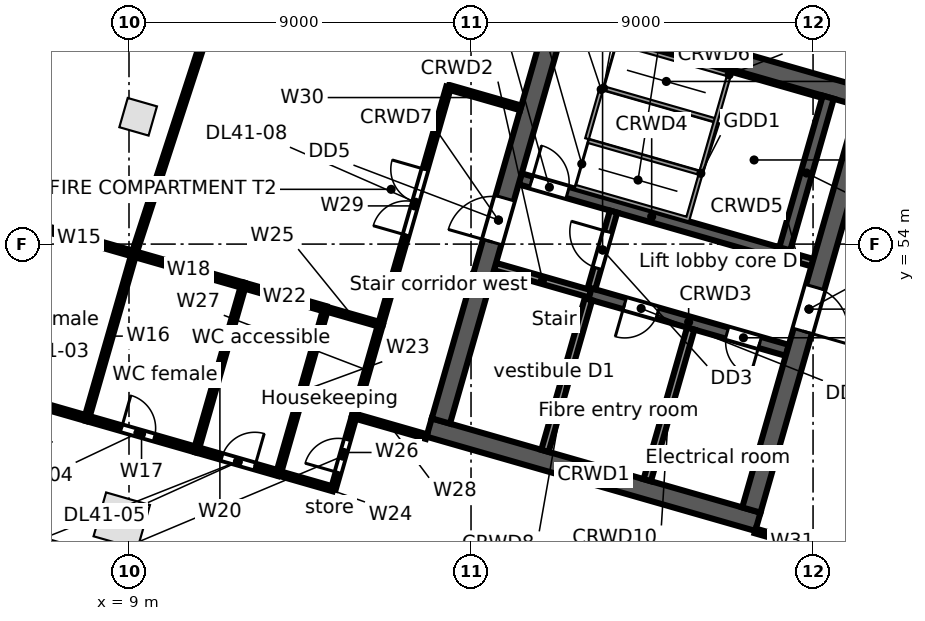
"""IFC4 building model, lengths in metres.
Left out: names, types, materials, properties, quantities, classifications, styles, units other than length and angle.
Written with IfcOpenShell. Run it as: python <this file> out.ifc"""

import sys

from ifc_helpers import new_model, si_unit, direction, frame, frame_2d, origin, origin_2d, place, context, subcontext, project, spatial, rectangle, extrude, element, fill, save


model = new_model("IFC4")
c1 = context("Model", 3, precision=1e-05, world=origin(), true_north=direction((0.0, 1.0)))
c2 = subcontext(c1, "Body", "Model", "MODEL_VIEW")
j1 = project(units=[si_unit("LENGTHUNIT", "METRE"), si_unit("PLANEANGLEUNIT", "RADIAN")], contexts=[c1])
p1 = place(None, origin())
s1 = spatial("IfcSite", under=j1, at=p1, CompositionType="ELEMENT")
p2 = place(p1, origin())
s2 = spatial("IfcBuilding", under=s1, at=p2, CompositionType="ELEMENT")
p3 = place(p2, frame((0.0, 0.0, 198.9)))
s3 = spatial("IfcBuildingStorey", under=s2, at=p3, CompositionType="ELEMENT", Elevation=198.9)
p4 = place(p3, frame((8.81, 46.722, 0.0), z_axis=(0.0, 0.0, 1.0), x_axis=(0.961261695938, -0.275637355817, 0.0)))
e1 = element("IfcColumn", 1, at=p4, inside=s3, PredefinedType="COLUMN", context=c2, shape_type="SweptSolid", body=[
    extrude(rectangle(XDim=1.2, YDim=1.2, at=origin_2d()), origin(), (0.0, 0.0, 1.0), 4.0),
])
p5 = place(p3, frame((9.241, 57.35, 0.0), z_axis=(0.0, 0.0, 1.0), x_axis=(0.961261695938, -0.275637355817, 0.0)))
e2 = element("IfcColumn", 2, at=p5, inside=s3, PredefinedType="COLUMN", context=c2, shape_type="SweptSolid", body=[
    extrude(rectangle(XDim=0.8, YDim=0.8, at=origin_2d()), origin(), (0.0, 0.0, 1.0), 4.0),
])
p6 = place(p3, frame((24.042, 41.106, 0.0), z_axis=(0.0, 0.0, 1.0), x_axis=(-0.961261693976, 0.275637362661, 0.0)))
e3 = element("IfcWall", 3, at=p6, inside=s3, PredefinedType="STANDARD", context=c2, shape_type="SweptSolid", body=[
    extrude(rectangle(XDim=24.948, YDim=0.3, at=frame_2d((12.474, 0.0))), origin(), (0.0, 0.0, 1.0), 3.65),
])
p7 = place(p6, frame((21.441, 0.0, 0.6)))
e4 = element("IfcOpeningElement", 4, at=p7, cuts=e3, PredefinedType="OPENING", context=c2, shape_type="SweptSolid", body=[
    extrude(rectangle(XDim=0.9, YDim=2.4, at=frame_2d((0.45, 1.2))), frame((0.0, 0.16, 0.0), z_axis=(0.0, -1.0, 0.0), x_axis=(1.0, 0.0, 0.0)), (0.0, 0.0, 1.0), 0.32),
])
p8 = place(p6, frame((13.121, 0.0, 0.6)))
e5 = element("IfcOpeningElement", 5, at=p8, cuts=e3, PredefinedType="OPENING", context=c2, shape_type="SweptSolid", body=[
    extrude(rectangle(XDim=0.9, YDim=2.4, at=frame_2d((0.45, 1.2))), frame((0.0, 0.16, 0.0), z_axis=(0.0, -1.0, 0.0), x_axis=(1.0, 0.0, 0.0)), (0.0, 0.0, 1.0), 0.32),
])
p9 = place(p6, frame((10.591, 0.0, 0.0)))
e6 = element("IfcOpeningElement", 6, at=p9, cuts=e3, PredefinedType="OPENING", context=c2, shape_type="SweptSolid", body=[
    extrude(rectangle(XDim=1.8, YDim=2.4, at=frame_2d((0.9, 1.2))), frame((0.0, 0.16, 0.0), z_axis=(0.0, -1.0, 0.0), x_axis=(1.0, 0.0, 0.0)), (0.0, 0.0, 1.0), 0.32),
])
p10 = place(p6, frame((4.8, 0.0, 0.6)))
e7 = element("IfcOpeningElement", 7, at=p10, cuts=e3, PredefinedType="OPENING", context=c2, shape_type="SweptSolid", body=[
    extrude(rectangle(XDim=0.9, YDim=2.4, at=frame_2d((0.45, 1.2))), frame((0.0, 0.16, 0.0), z_axis=(0.0, -1.0, 0.0), x_axis=(1.0, 0.0, 0.0)), (0.0, 0.0, 1.0), 0.32),
])
p11 = place(p6, frame((2.27, 0.0, 0.0)))
e8 = element("IfcOpeningElement", 8, at=p11, cuts=e3, PredefinedType="OPENING", context=c2, shape_type="SweptSolid", body=[
    extrude(rectangle(XDim=1.8, YDim=2.4, at=frame_2d((0.9, 1.2))), frame((0.0, 0.16, 0.0), z_axis=(0.0, -1.0, 0.0), x_axis=(1.0, 0.0, 0.0)), (0.0, 0.0, 1.0), 0.32),
])
p12 = place(p3, frame((37.399, 59.851, 0.0), z_axis=(0.0, 0.0, 1.0), x_axis=(-0.529919986982, -0.848047644532, 0.0)))
e9 = element("IfcWall", 9, at=p12, inside=s3, PredefinedType="STANDARD", context=c2, shape_type="SweptSolid", body=[
    extrude(rectangle(XDim=21.125, YDim=0.3, at=frame_2d((10.562, 0.0))), origin(), (0.0, 0.0, 1.0), 3.65),
])
p13 = place(p12, frame((16.687, 0.0, 0.6)))
e10 = element("IfcOpeningElement", 10, at=p13, cuts=e9, PredefinedType="OPENING", context=c2, shape_type="SweptSolid", body=[
    extrude(rectangle(XDim=0.9, YDim=2.4, at=frame_2d((0.45, 1.2))), frame((0.0, 0.16, 0.0), z_axis=(0.0, -1.0, 0.0), x_axis=(1.0, 0.0, 0.0)), (0.0, 0.0, 1.0), 0.32),
])
p14 = place(p12, frame((6.187, 0.0, 0.6)))
e11 = element("IfcOpeningElement", 11, at=p14, cuts=e9, PredefinedType="OPENING", context=c2, shape_type="SweptSolid", body=[
    extrude(rectangle(XDim=0.9, YDim=2.4, at=frame_2d((0.45, 1.2))), frame((0.0, 0.16, 0.0), z_axis=(0.0, -1.0, 0.0), x_axis=(1.0, 0.0, 0.0)), (0.0, 0.0, 1.0), 0.32),
])
p15 = place(p3, frame((16.897, 49.173, 0.0), z_axis=(0.0, 0.0, 1.0), x_axis=(0.96126248289, -0.275634611374, 0.0)))
e12 = element("IfcWall", 12, at=p15, inside=s3, PredefinedType="SOLIDWALL", context=c2, shape_type="SweptSolid", body=[
    extrude(rectangle(XDim=9.0, YDim=0.5, at=frame_2d((4.5, 0.0))), origin(), (0.0, 0.0, 1.0), 3.65),
])
p16 = place(p3, frame((18.632, 53.409, 0.0), z_axis=(0.0, 0.0, 1.0), x_axis=(0.961247078216, -0.275688328772, 0.0)))
e13 = element("IfcWall", 13, at=p16, inside=s3, PredefinedType="SOLIDWALL", context=c2, shape_type="SweptSolid", body=[
    extrude(rectangle(XDim=2.6, YDim=0.2, at=frame_2d((1.3, 0.0))), origin(), (0.0, 0.0, 1.0), 3.65),
])
p17 = place(p3, frame((21.131, 52.692, 0.0), z_axis=(0.0, 0.0, 1.0), x_axis=(0.961271043721, -0.27560475414, 0.0)))
e14 = element("IfcWall", 14, at=p17, inside=s3, PredefinedType="SOLIDWALL", context=c2, shape_type="SweptSolid", body=[
    extrude(rectangle(XDim=5.4, YDim=0.3, at=frame_2d((2.7, 0.0))), origin(), (0.0, 0.0, 1.0), 3.65),
])
p18 = place(p17, frame((0.95, 0.0, 0.0)))
e15 = element("IfcOpeningElement", 15, at=p18, cuts=e14, PredefinedType="OPENING", context=c2, shape_type="SweptSolid", body=[
    extrude(rectangle(XDim=0.9, YDim=2.1, at=frame_2d((0.45, 1.05))), frame((0.0, 0.16, 0.0), z_axis=(0.0, -1.0, 0.0), x_axis=(1.0, 0.0, 0.0)), (0.0, 0.0, 1.0), 0.32),
])
p19 = place(p17, frame((3.75, 0.0, 0.0)))
e16 = element("IfcOpeningElement", 16, at=p19, cuts=e14, PredefinedType="OPENING", context=c2, shape_type="SweptSolid", body=[
    extrude(rectangle(XDim=0.9, YDim=2.1, at=frame_2d((0.45, 1.05))), frame((0.0, 0.16, 0.0), z_axis=(0.0, -1.0, 0.0), x_axis=(1.0, 0.0, 0.0)), (0.0, 0.0, 1.0), 0.32),
])
p20 = place(p3, frame((19.293, 55.716, 0.0), z_axis=(0.0, 0.0, 1.0), x_axis=(0.96125862491, -0.275648065539, 0.0)))
e17 = element("IfcWall", 17, at=p20, inside=s3, PredefinedType="SOLIDWALL", context=c2, shape_type="SweptSolid", body=[
    extrude(rectangle(XDim=7.2, YDim=0.3, at=frame_2d((3.6, 0.0))), origin(), (0.0, 0.0, 1.0), 3.65),
])
p21 = place(p20, frame((0.3, 0.0, 0.0)))
e18 = element("IfcOpeningElement", 18, at=p21, cuts=e17, PredefinedType="OPENING", context=c2, shape_type="SweptSolid", body=[
    extrude(rectangle(XDim=1.0, YDim=2.1, at=frame_2d((0.5, 1.05))), frame((0.0, 0.16, 0.0), z_axis=(0.0, -1.0, 0.0), x_axis=(1.0, 0.0, 0.0)), (0.0, 0.0, 1.0), 0.32),
])
p22 = place(p3, frame((26.214, 53.732, 0.0), z_axis=(0.0, 0.0, 1.0), x_axis=(0.961200870072, -0.275849392554, 0.0)))
e19 = element("IfcWall", 19, at=p22, inside=s3, PredefinedType="SOLIDWALL", context=c2, shape_type="SweptSolid", body=[
    extrude(rectangle(XDim=0.8, YDim=0.2, at=frame_2d((0.4, 0.0))), origin(), (0.0, 0.0, 1.0), 3.65),
])
p23 = place(p3, frame((20.067, 60.228, 0.0), z_axis=(0.0, 0.0, 1.0), x_axis=(0.96126248289, -0.275634611374, 0.0)))
e20 = element("IfcWall", 20, at=p23, inside=s3, PredefinedType="SOLIDWALL", context=c2, shape_type="SweptSolid", body=[
    extrude(rectangle(XDim=9.0, YDim=0.5, at=frame_2d((4.5, 0.0))), origin(), (0.0, 0.0, 1.0), 3.65),
])
p24 = place(p3, frame((17.206, 49.344, 0.0), z_axis=(0.0, 0.0, 1.0), x_axis=(0.275632651182, 0.961263044958, 0.0)))
e21 = element("IfcWall", 21, at=p24, inside=s3, PredefinedType="SOLIDWALL", context=c2, shape_type="SweptSolid", body=[
    extrude(rectangle(XDim=11.0, YDim=0.5, at=frame_2d((5.5, 0.0))), origin(), (0.0, 0.0, 1.0), 3.65),
])
p25 = place(p24, frame((4.9, 0.0, 0.0)))
e22 = element("IfcOpeningElement", 22, at=p25, cuts=e21, PredefinedType="OPENING", context=c2, shape_type="SweptSolid", body=[
    extrude(rectangle(XDim=1.2, YDim=2.1, at=frame_2d((0.6, 1.05))), frame((0.0, 0.26, 0.0), z_axis=(0.0, -1.0, 0.0), x_axis=(1.0, 0.0, 0.0)), (0.0, 0.0, 1.0), 0.52),
])
p26 = place(p3, frame((19.946, 48.559, 0.0), z_axis=(0.0, 0.0, 1.0), x_axis=(0.275668905258, 0.961252648721, 0.0)))
e23 = element("IfcWall", 23, at=p26, inside=s3, PredefinedType="SOLIDWALL", context=c2, shape_type="SweptSolid", body=[
    extrude(rectangle(XDim=4.15, YDim=0.2, at=frame_2d((2.075, 0.0))), origin(), (0.0, 0.0, 1.0), 3.65),
])
p27 = place(p3, frame((21.172, 52.837, 0.0), z_axis=(0.0, 0.0, 1.0), x_axis=(0.275657676022, 0.961255868981, 0.0)))
e24 = element("IfcWall", 24, at=p27, inside=s3, PredefinedType="PARTITIONING", context=c2, shape_type="SweptSolid", body=[
    extrude(rectangle(XDim=2.1, YDim=0.2, at=frame_2d((1.05, 0.0))), origin(), (0.0, 0.0, 1.0), 3.65),
])
p28 = place(p27, frame((0.55, 0.0, 0.0)))
e25 = element("IfcOpeningElement", 25, at=p28, cuts=e24, PredefinedType="OPENING", context=c2, shape_type="SweptSolid", body=[
    extrude(rectangle(XDim=1.0, YDim=2.1, at=frame_2d((0.5, 1.05))), frame((0.0, 0.11, 0.0), z_axis=(0.0, -1.0, 0.0), x_axis=(1.0, 0.0, 0.0)), (0.0, 0.0, 1.0), 0.22),
])
p29 = place(p3, frame((22.637, 47.787, 0.0), z_axis=(0.0, 0.0, 1.0), x_axis=(0.275614546295, 0.961268236171, 0.0)))
e26 = element("IfcWall", 26, at=p29, inside=s3, PredefinedType="PARTITIONING", context=c2, shape_type="SweptSolid", body=[
    extrude(rectangle(XDim=4.15, YDim=0.2, at=frame_2d((2.075, 0.0))), origin(), (0.0, 0.0, 1.0), 3.65),
])
p30 = place(p3, frame((26.256, 53.876, 0.0), z_axis=(0.0, 0.0, 1.0), x_axis=(0.275614546295, 0.961268236171, 0.0)))
e27 = element("IfcWall", 27, at=p30, inside=s3, PredefinedType="SOLIDWALL", context=c2, shape_type="SweptSolid", body=[
    extrude(rectangle(XDim=4.15, YDim=0.3, at=frame_2d((2.075, 0.0))), origin(), (0.0, 0.0, 1.0), 3.65),
])
p31 = place(p3, frame((25.377, 47.002, 0.0), z_axis=(0.0, 0.0, 1.0), x_axis=(0.275632651182, 0.961263044958, 0.0)))
e28 = element("IfcWall", 28, at=p31, inside=s3, PredefinedType="SOLIDWALL", context=c2, shape_type="SweptSolid", body=[
    extrude(rectangle(XDim=11.0, YDim=0.5, at=frame_2d((5.5, 0.0))), origin(), (0.0, 0.0, 1.0), 3.65),
])
p32 = place(p31, frame((4.9, 0.0, 0.0)))
e29 = element("IfcOpeningElement", 29, at=p32, cuts=e28, PredefinedType="OPENING", context=c2, shape_type="SweptSolid", body=[
    extrude(rectangle(XDim=1.2, YDim=2.1, at=frame_2d((0.6, 1.05))), frame((0.0, 0.26, 0.0), z_axis=(0.0, -1.0, 0.0), x_axis=(1.0, 0.0, 0.0)), (0.0, 0.0, 1.0), 0.52),
])
p33 = place(p3, frame((5.004, 50.243, 0.0), z_axis=(0.0, 0.0, 1.0), x_axis=(0.961268664977, -0.27561305073, 0.0)))
e30 = element("IfcWall", 30, at=p33, inside=s3, PredefinedType="PARTITIONING", context=c2, shape_type="SweptSolid", body=[
    extrude(rectangle(XDim=3.0, YDim=0.15, at=frame_2d((1.5, 0.0))), origin(), (0.0, 0.0, 1.0), 3.65),
])
p34 = place(p33, frame((0.95, 0.0, 0.0)))
e31 = element("IfcOpeningElement", 31, at=p34, cuts=e30, PredefinedType="OPENING", context=c2, shape_type="SweptSolid", body=[
    extrude(rectangle(XDim=0.9, YDim=2.1, at=frame_2d((0.45, 1.05))), frame((0.0, 0.085, 0.0), z_axis=(0.0, -1.0, 0.0), x_axis=(1.0, 0.0, 0.0)), (0.0, 0.0, 1.0), 0.17),
])
p35 = place(p3, frame((6.245, 54.568, 0.0), z_axis=(0.0, 0.0, 1.0), x_axis=(0.961240918172, -0.275709806194, 0.0)))
e32 = element("IfcWall", 32, at=p35, inside=s3, PredefinedType="PARTITIONING", context=c2, shape_type="SweptSolid", body=[
    extrude(rectangle(XDim=3.0, YDim=0.15, at=frame_2d((1.5, 0.0))), origin(), (0.0, 0.0, 1.0), 2.83),
])
p36 = place(p3, frame((7.888, 49.416, 0.0), z_axis=(0.0, 0.0, 1.0), x_axis=(0.275803080638, 0.96121415965, 0.0)))
e33 = element("IfcWall", 33, at=p36, inside=s3, PredefinedType="PARTITIONING", context=c2, shape_type="SweptSolid", body=[
    extrude(rectangle(XDim=4.5, YDim=0.125, at=frame_2d((2.25, 0.0))), origin(), (0.0, 0.0, 1.0), 2.83),
])
p37 = place(p3, frame((7.888, 49.416, 0.0), z_axis=(0.0, 0.0, 1.0), x_axis=(0.961268664977, -0.27561305073, 0.0)))
e34 = element("IfcWall", 34, at=p37, inside=s3, PredefinedType="PARTITIONING", context=c2, shape_type="SweptSolid", body=[
    extrude(rectangle(XDim=3.0, YDim=0.15, at=frame_2d((1.5, 0.0))), origin(), (0.0, 0.0, 1.0), 2.718),
])
p38 = place(p37, frame((0.95, 0.0, 0.0)))
e35 = element("IfcOpeningElement", 35, at=p38, cuts=e34, PredefinedType="OPENING", context=c2, shape_type="SweptSolid", body=[
    extrude(rectangle(XDim=0.9, YDim=2.1, at=frame_2d((0.45, 1.05))), frame((0.0, 0.085, 0.0), z_axis=(0.0, -1.0, 0.0), x_axis=(1.0, 0.0, 0.0)), (0.0, 0.0, 1.0), 0.17),
])
p39 = place(p3, frame((9.129, 53.741, 0.0), z_axis=(0.0, 0.0, 1.0), x_axis=(0.961243927922, -0.275699312717, 0.0)))
e36 = element("IfcWall", 36, at=p39, inside=s3, PredefinedType="PARTITIONING", context=c2, shape_type="SweptSolid", body=[
    extrude(rectangle(XDim=2.999, YDim=0.15, at=frame_2d((1.5, 0.0))), origin(), (0.0, 0.0, 1.0), 2.718),
])
p40 = place(p3, frame((9.129, 53.741, 0.0), z_axis=(0.0, 0.0, 1.0), x_axis=(0.309576741849, 0.950874461171, 0.0)))
e37 = element("IfcWall", 37, at=p40, inside=s3, PredefinedType="PARTITIONING", context=c2, shape_type="SweptSolid", body=[
    extrude(rectangle(XDim=14.895, YDim=0.125, at=frame_2d((7.447, 0.0))), origin(), (0.0, 0.0, 1.0), 2.718),
])
p41 = place(p3, frame((10.772, 48.589, 0.0), z_axis=(0.0, 0.0, 1.0), x_axis=(0.275602532653, 0.961271680637, 0.0)))
e38 = element("IfcWall", 38, at=p41, inside=s3, PredefinedType="PARTITIONING", context=c2, shape_type="SweptSolid", body=[
    extrude(rectangle(XDim=4.499, YDim=0.125, at=frame_2d((2.25, 0.0))), origin(), (0.0, 0.0, 1.0), 3.65),
])
p42 = place(p3, frame((10.772, 48.589, 0.0), z_axis=(0.0, 0.0, 1.0), x_axis=(0.96127791106, -0.275580800688, 0.0)))
e39 = element("IfcWall", 39, at=p42, inside=s3, PredefinedType="PARTITIONING", context=c2, shape_type="SweptSolid", body=[
    extrude(rectangle(XDim=2.25, YDim=0.15, at=frame_2d((1.125, 0.0))), origin(), (0.0, 0.0, 1.0), 3.65),
])
p43 = place(p42, frame((0.7, 0.0, 0.0)))
e40 = element("IfcOpeningElement", 40, at=p43, cuts=e39, PredefinedType="OPENING", context=c2, shape_type="SweptSolid", body=[
    extrude(rectangle(XDim=0.9, YDim=2.1, at=frame_2d((0.45, 1.05))), frame((0.0, 0.085, 0.0), z_axis=(0.0, -1.0, 0.0), x_axis=(1.0, 0.0, 0.0)), (0.0, 0.0, 1.0), 0.17),
])
p44 = place(p3, frame((12.012, 52.914, 0.0), z_axis=(0.0, 0.0, 1.0), x_axis=(0.96127791106, -0.275580800688, 0.0)))
e41 = element("IfcWall", 41, at=p44, inside=s3, PredefinedType="PARTITIONING", context=c2, shape_type="SweptSolid", body=[
    extrude(rectangle(XDim=2.25, YDim=0.15, at=frame_2d((1.125, 0.0))), origin(), (0.0, 0.0, 1.0), 3.65),
])
p45 = place(p3, frame((12.935, 47.969, 0.0), z_axis=(0.0, 0.0, 1.0), x_axis=(0.275602532653, 0.961271680637, 0.0)))
e42 = element("IfcWall", 42, at=p45, inside=s3, PredefinedType="PARTITIONING", context=c2, shape_type="SweptSolid", body=[
    extrude(rectangle(XDim=4.499, YDim=0.125, at=frame_2d((2.25, 0.0))), origin(), (0.0, 0.0, 1.0), 3.65),
])
p46 = place(p3, frame((12.935, 47.969, 0.0), z_axis=(0.0, 0.0, 1.0), x_axis=(0.961154610169, -0.276010534854, 0.0)))
e43 = element("IfcWall", 43, at=p46, inside=s3, PredefinedType="PARTITIONING", context=c2, shape_type="SweptSolid", body=[
    extrude(rectangle(XDim=1.5, YDim=0.125, at=frame_2d((0.75, 0.0))), origin(), (0.0, 0.0, 1.0), 3.65),
])
p47 = place(p3, frame((14.175, 52.294, 0.0), z_axis=(0.0, 0.0, 1.0), x_axis=(0.961370232732, -0.275258561387, 0.0)))
e44 = element("IfcWall", 44, at=p47, inside=s3, PredefinedType="PARTITIONING", context=c2, shape_type="SweptSolid", body=[
    extrude(rectangle(XDim=1.5, YDim=0.125, at=frame_2d((0.75, 0.0))), origin(), (0.0, 0.0, 1.0), 3.65),
])
p48 = place(p3, frame((14.377, 47.555, 0.0), z_axis=(0.0, 0.0, 1.0), x_axis=(0.275446387355, 0.961316434736, 0.0)))
e45 = element("IfcWall", 45, at=p48, inside=s3, PredefinedType="PARTITIONING", context=c2, shape_type="SweptSolid", body=[
    extrude(rectangle(XDim=2.0, YDim=0.125, at=frame_2d((1.0, 0.0))), origin(), (0.0, 0.0, 1.0), 3.65),
])
p49 = place(p48, frame((0.45, 0.0, 0.0)))
e46 = element("IfcOpeningElement", 46, at=p49, cuts=e45, PredefinedType="OPENING", context=c2, shape_type="SweptSolid", body=[
    extrude(rectangle(XDim=0.9, YDim=2.1, at=frame_2d((0.45, 1.05))), frame((0.0, 0.073, 0.0), z_axis=(0.0, -1.0, 0.0), x_axis=(1.0, 0.0, 0.0)), (0.0, 0.0, 1.0), 0.145),
])
p50 = place(p3, frame((14.928, 49.478, 0.0), z_axis=(0.0, 0.0, 1.0), x_axis=(0.275598116036, 0.961272946898, 0.0)))
e47 = element("IfcWall", 47, at=p50, inside=s3, PredefinedType="PARTITIONING", context=c2, shape_type="SweptSolid", body=[
    extrude(rectangle(XDim=2.5, YDim=0.125, at=frame_2d((1.25, 0.0))), origin(), (0.0, 0.0, 1.0), 3.65),
])
p51 = place(p3, frame((14.928, 49.478, 0.0), z_axis=(0.0, 0.0, 1.0), x_axis=(0.961243778232, -0.27569983462, 0.0)))
e48 = element("IfcWall", 48, at=p51, inside=s3, PredefinedType="PARTITIONING", context=c2, shape_type="SweptSolid", body=[
    extrude(rectangle(XDim=1.977, YDim=0.125, at=frame_2d((0.988, 0.0))), origin(), (0.0, 0.0, 1.0), 3.65),
])
p52 = place(p3, frame((15.617, 51.881, 0.0), z_axis=(0.0, 0.0, 1.0), x_axis=(0.275703259795, 0.961242795832, 0.0)))
e49 = element("IfcWall", 49, at=p52, inside=s3, PredefinedType="PARTITIONING", context=c2, shape_type="SweptSolid", body=[
    extrude(rectangle(XDim=6.5, YDim=0.125, at=frame_2d((3.25, 0.0))), origin(), (0.0, 0.0, 1.0), 2.718),
])
p53 = place(p52, frame((2.45, 0.0, 0.0)))
e50 = element("IfcOpeningElement", 50, at=p53, cuts=e49, PredefinedType="OPENING", context=c2, shape_type="SweptSolid", body=[
    extrude(rectangle(XDim=1.8, YDim=2.1, at=frame_2d((0.9, 1.05))), frame((0.0, 0.073, 0.0), z_axis=(0.0, -1.0, 0.0), x_axis=(1.0, 0.0, 0.0)), (0.0, 0.0, 1.0), 0.145),
])
p54 = place(p3, frame((17.409, 58.129, 0.0), z_axis=(0.0, 0.0, 1.0), x_axis=(0.961253165474, -0.275667103345, 0.0)))
e51 = element("IfcWall", 51, at=p54, inside=s3, PredefinedType="PARTITIONING", context=c2, shape_type="SweptSolid", body=[
    extrude(rectangle(XDim=1.977, YDim=0.125, at=frame_2d((0.988, 0.0))), origin(), (0.0, 0.0, 1.0), 3.65),
])
p55 = place(p3, frame((25.479, 46.452, 0.0), z_axis=(0.0, 0.0, 1.0), x_axis=(0.961245725795, -0.275693044238, 0.0)))
e52 = element("IfcWall", 52, at=p55, inside=s3, PredefinedType="PARTITIONING", context=c2, shape_type="SweptSolid", body=[
    extrude(rectangle(XDim=2.023, YDim=0.125, at=frame_2d((1.012, 0.0))), origin(), (0.0, 0.0, 1.0), 2.83),
])
p56 = place(p21, origin())
e53 = element("IfcDoor", 53, at=p56, inside=s3, OperationType="SINGLE_SWING_LEFT", PredefinedType="DOOR", context=c2, shape_type="SweptSolid", body=[
    extrude(rectangle(XDim=1.0, YDim=2.1, at=frame_2d((0.5, 1.05))), frame((0.0, 0.025, 0.0), z_axis=(0.0, -1.0, 0.0), x_axis=(1.0, 0.0, 0.0)), (0.0, 0.0, 1.0), 0.05),
])
fill(e18, e53)
p57 = place(p28, origin())
e54 = element("IfcDoor", 54, at=p57, inside=s3, OperationType="SINGLE_SWING_RIGHT", PredefinedType="DOOR", context=c2, shape_type="SweptSolid", body=[
    extrude(rectangle(XDim=1.0, YDim=2.1, at=frame_2d((0.5, 1.05))), frame((0.0, 0.025, 0.0), z_axis=(0.0, -1.0, 0.0), x_axis=(1.0, 0.0, 0.0)), (0.0, 0.0, 1.0), 0.05),
])
fill(e25, e54)
p58 = place(p25, origin())
e55 = element("IfcDoor", 55, at=p58, inside=s3, OperationType="SINGLE_SWING_LEFT", PredefinedType="DOOR", context=c2, shape_type="SweptSolid", body=[
    extrude(rectangle(XDim=1.2, YDim=2.1, at=frame_2d((0.6, 1.05))), frame((0.0, 0.025, 0.0), z_axis=(0.0, -1.0, 0.0), x_axis=(1.0, 0.0, 0.0)), (0.0, 0.0, 1.0), 0.05),
])
fill(e22, e55)
p59 = place(p32, frame((1.2, 0.0, 0.0), z_axis=(0.0, 0.0, 1.0), x_axis=(-1.0, 0.0, 0.0)))
e56 = element("IfcDoor", 56, at=p59, inside=s3, OperationType="SINGLE_SWING_RIGHT", PredefinedType="DOOR", context=c2, shape_type="SweptSolid", body=[
    extrude(rectangle(XDim=1.2, YDim=2.1, at=frame_2d((0.6, 1.05))), frame((0.0, 0.025, 0.0), z_axis=(0.0, -1.0, 0.0), x_axis=(1.0, 0.0, 0.0)), (0.0, 0.0, 1.0), 0.05),
])
fill(e29, e56)
p60 = place(p18, frame((0.9, 0.0, 0.0), z_axis=(0.0, 0.0, 1.0), x_axis=(-1.0, 0.0, 0.0)))
e57 = element("IfcDoor", 57, at=p60, inside=s3, OperationType="SINGLE_SWING_RIGHT", PredefinedType="DOOR", context=c2, shape_type="SweptSolid", body=[
    extrude(rectangle(XDim=0.9, YDim=2.1, at=frame_2d((0.45, 1.05))), frame((0.0, 0.025, 0.0), z_axis=(0.0, -1.0, 0.0), x_axis=(1.0, 0.0, 0.0)), (0.0, 0.0, 1.0), 0.05),
])
fill(e15, e57)
p61 = place(p19, frame((0.9, 0.0, 0.0), z_axis=(0.0, 0.0, 1.0), x_axis=(-1.0, 0.0, 0.0)))
e58 = element("IfcDoor", 58, at=p61, inside=s3, OperationType="SINGLE_SWING_LEFT", PredefinedType="DOOR", context=c2, shape_type="SweptSolid", body=[
    extrude(rectangle(XDim=0.9, YDim=2.1, at=frame_2d((0.45, 1.05))), frame((0.0, 0.025, 0.0), z_axis=(0.0, -1.0, 0.0), x_axis=(1.0, 0.0, 0.0)), (0.0, 0.0, 1.0), 0.05),
])
fill(e16, e58)
p62 = place(p38, origin())
e59 = element("IfcDoor", 59, at=p62, inside=s3, OperationType="SINGLE_SWING_LEFT", PredefinedType="DOOR", context=c2, shape_type="SweptSolid", body=[
    extrude(rectangle(XDim=0.9, YDim=2.1, at=frame_2d((0.45, 1.05))), frame((0.0, 0.025, 0.0), z_axis=(0.0, -1.0, 0.0), x_axis=(1.0, 0.0, 0.0)), (0.0, 0.0, 1.0), 0.05),
])
fill(e35, e59)
p63 = place(p43, origin())
e60 = element("IfcDoor", 60, at=p63, inside=s3, OperationType="SINGLE_SWING_RIGHT", PredefinedType="DOOR", context=c2, shape_type="SweptSolid", body=[
    extrude(rectangle(XDim=0.9, YDim=2.1, at=frame_2d((0.45, 1.05))), frame((0.0, 0.025, 0.0), z_axis=(0.0, -1.0, 0.0), x_axis=(1.0, 0.0, 0.0)), (0.0, 0.0, 1.0), 0.05),
])
fill(e40, e60)
p64 = place(p49, origin())
e61 = element("IfcDoor", 61, at=p64, inside=s3, OperationType="SINGLE_SWING_LEFT", PredefinedType="DOOR", context=c2, shape_type="SweptSolid", body=[
    extrude(rectangle(XDim=0.9, YDim=2.1, at=frame_2d((0.45, 1.05))), frame((0.0, 0.025, 0.0), z_axis=(0.0, -1.0, 0.0), x_axis=(1.0, 0.0, 0.0)), (0.0, 0.0, 1.0), 0.05),
])
fill(e46, e61)
p65 = place(p53, origin())
e62 = element("IfcDoor", 62, at=p65, inside=s3, OperationType="DOUBLE_DOOR_SINGLE_SWING", PredefinedType="DOOR", context=c2, shape_type="SweptSolid", body=[
    extrude(rectangle(XDim=1.8, YDim=2.1, at=frame_2d((0.9, 1.05))), frame((0.0, 0.025, 0.0), z_axis=(0.0, -1.0, 0.0), x_axis=(1.0, 0.0, 0.0)), (0.0, 0.0, 1.0), 0.05),
])
fill(e50, e62)
save(model, sys.argv[1])
